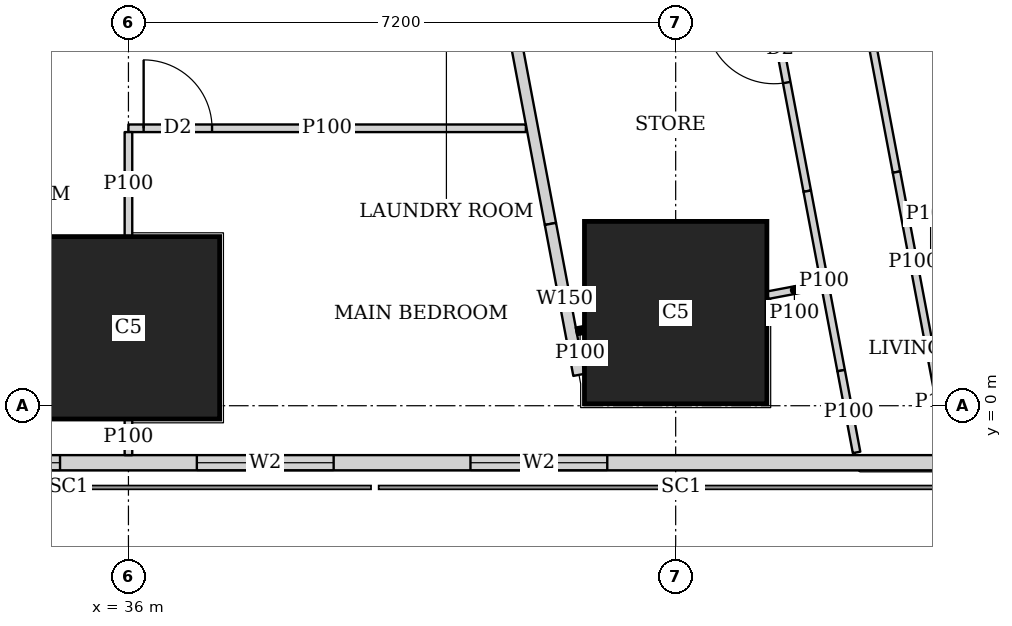
"""IFC4 building model, lengths in metres.
Left out: names, types, materials, properties, quantities, classifications, styles, units other than length and angle.
Written with IfcOpenShell. Run it as: python <this file> out.ifc"""

import sys

from ifc_helpers import new_model, si_unit, direction, frame, frame_2d, origin, origin_2d, place, context, subcontext, project, spatial, rectangle, extrude, element, fill, save


model = new_model("IFC4")
c1 = context("Model", 3, precision=1e-05, world=origin(), true_north=direction((0.0, 1.0)))
c2 = subcontext(c1, "Body", "Model", "MODEL_VIEW")
j1 = project(units=[si_unit("LENGTHUNIT", "METRE"), si_unit("PLANEANGLEUNIT", "RADIAN")], contexts=[c1])
p1 = place(None, origin())
s1 = spatial("IfcSite", under=j1, at=p1, CompositionType="ELEMENT")
p2 = place(p1, origin())
s2 = spatial("IfcBuilding", under=s1, at=p2, CompositionType="ELEMENT")
p3 = place(p2, frame((0.0, 0.0, 242.45)))
s3 = spatial("IfcBuildingStorey", under=s2, at=p3, CompositionType="ELEMENT", Elevation=242.45)
for number, where, z_axis, x_axis in (
    (1, (36.0, 1.025, 0.0), (0.0, 0.0, 1.0), (1.0, 0.0, 0.0)),
    (2, (43.2, 1.225, 0.0), (0.0, 0.0, 1.0), (1.0, 0.0, 0.0)),
):
    element("IfcColumn", number, at=place(p3, frame(where, z_axis=z_axis, x_axis=x_axis)), inside=s3, PredefinedType="COLUMN", context=c2, shape_type="SweptSolid", body=[
        extrude(rectangle(XDim=2.4, YDim=2.4, at=origin_2d()), origin(), (0.0, 0.0, 1.0), 3.75),
    ])
p4 = place(p3, frame((14.563, -0.75, 0.0), z_axis=(0.0, 0.0, 1.0), x_axis=(1.0, 0.0, 0.0)))
e3 = element("IfcWall", 3, at=p4, inside=s3, PredefinedType="SOLIDWALL", context=c2, shape_type="SweptSolid", body=[
    extrude(rectangle(XDim=33.228, YDim=0.2, at=frame_2d((16.614, 0.0))), origin(), (0.0, 0.0, 1.0), 3.45),
])
p5 = place(p4, frame((2.319, 0.0, 0.9)))
e4 = element("IfcOpeningElement", 4, at=p5, cuts=e3, PredefinedType="OPENING", context=c2, shape_type="SweptSolid", body=[
    extrude(rectangle(XDim=2.4, YDim=1.5, at=frame_2d((1.2, 0.75))), frame((0.0, 0.11, 0.0), z_axis=(0.0, -1.0, 0.0), x_axis=(1.0, 0.0, 0.0)), (0.0, 0.0, 1.0), 0.22),
])
p6 = place(p4, frame((7.937, 0.0, 0.9)))
e5 = element("IfcOpeningElement", 5, at=p6, cuts=e3, PredefinedType="OPENING", context=c2, shape_type="SweptSolid", body=[
    extrude(rectangle(XDim=1.8, YDim=1.5, at=frame_2d((0.9, 0.75))), frame((0.0, 0.11, 0.0), z_axis=(0.0, -1.0, 0.0), x_axis=(1.0, 0.0, 0.0)), (0.0, 0.0, 1.0), 0.22),
])
p7 = place(p4, frame((11.537, 0.0, 0.9)))
e6 = element("IfcOpeningElement", 6, at=p7, cuts=e3, PredefinedType="OPENING", context=c2, shape_type="SweptSolid", body=[
    extrude(rectangle(XDim=1.8, YDim=1.5, at=frame_2d((0.9, 0.75))), frame((0.0, 0.11, 0.0), z_axis=(0.0, -1.0, 0.0), x_axis=(1.0, 0.0, 0.0)), (0.0, 0.0, 1.0), 0.22),
])
p8 = place(p4, frame((15.137, 0.0, 0.9)))
e7 = element("IfcOpeningElement", 7, at=p8, cuts=e3, PredefinedType="OPENING", context=c2, shape_type="SweptSolid", body=[
    extrude(rectangle(XDim=1.8, YDim=1.5, at=frame_2d((0.9, 0.75))), frame((0.0, 0.11, 0.0), z_axis=(0.0, -1.0, 0.0), x_axis=(1.0, 0.0, 0.0)), (0.0, 0.0, 1.0), 0.22),
])
p9 = place(p4, frame((18.737, 0.0, 0.9)))
e8 = element("IfcOpeningElement", 8, at=p9, cuts=e3, PredefinedType="OPENING", context=c2, shape_type="SweptSolid", body=[
    extrude(rectangle(XDim=1.8, YDim=1.5, at=frame_2d((0.9, 0.75))), frame((0.0, 0.11, 0.0), z_axis=(0.0, -1.0, 0.0), x_axis=(1.0, 0.0, 0.0)), (0.0, 0.0, 1.0), 0.22),
])
p10 = place(p4, frame((22.337, 0.0, 0.9)))
e9 = element("IfcOpeningElement", 9, at=p10, cuts=e3, PredefinedType="OPENING", context=c2, shape_type="SweptSolid", body=[
    extrude(rectangle(XDim=1.8, YDim=1.5, at=frame_2d((0.9, 0.75))), frame((0.0, 0.11, 0.0), z_axis=(0.0, -1.0, 0.0), x_axis=(1.0, 0.0, 0.0)), (0.0, 0.0, 1.0), 0.22),
])
p11 = place(p4, frame((25.937, 0.0, 0.9)))
e10 = element("IfcOpeningElement", 10, at=p11, cuts=e3, PredefinedType="OPENING", context=c2, shape_type="SweptSolid", body=[
    extrude(rectangle(XDim=1.8, YDim=1.5, at=frame_2d((0.9, 0.75))), frame((0.0, 0.11, 0.0), z_axis=(0.0, -1.0, 0.0), x_axis=(1.0, 0.0, 0.0)), (0.0, 0.0, 1.0), 0.22),
])
p12 = place(p3, frame((50.653, 2.703, 0.0), z_axis=(0.0, 0.0, 1.0), x_axis=(-0.185612026696, 0.982623109613, 0.0)))
e11 = element("IfcWall", 11, at=p12, inside=s3, PredefinedType="SOLIDWALL", context=c2, shape_type="SweptSolid", body=[
    extrude(rectangle(XDim=41.393, YDim=0.2, at=frame_2d((20.697, 0.0))), origin(), (0.0, 0.0, 1.0), 3.45),
])
p13 = place(p12, frame((1.633, 0.0, 0.9)))
e12 = element("IfcOpeningElement", 12, at=p13, cuts=e11, PredefinedType="OPENING", context=c2, shape_type="SweptSolid", body=[
    extrude(rectangle(XDim=1.8, YDim=1.5, at=frame_2d((0.9, 0.75))), frame((0.0, 0.11, 0.0), z_axis=(0.0, -1.0, 0.0), x_axis=(1.0, 0.0, 0.0)), (0.0, 0.0, 1.0), 0.22),
])
p14 = place(p12, frame((6.032, 0.0, 0.9)))
e13 = element("IfcOpeningElement", 13, at=p14, cuts=e11, PredefinedType="OPENING", context=c2, shape_type="SweptSolid", body=[
    extrude(rectangle(XDim=1.8, YDim=1.5, at=frame_2d((0.9, 0.75))), frame((0.0, 0.11, 0.0), z_axis=(0.0, -1.0, 0.0), x_axis=(1.0, 0.0, 0.0)), (0.0, 0.0, 1.0), 0.22),
])
p15 = place(p12, frame((9.848, 0.0, 0.9)))
e14 = element("IfcOpeningElement", 14, at=p15, cuts=e11, PredefinedType="OPENING", context=c2, shape_type="SweptSolid", body=[
    extrude(rectangle(XDim=1.8, YDim=1.5, at=frame_2d((0.9, 0.75))), frame((0.0, 0.11, 0.0), z_axis=(0.0, -1.0, 0.0), x_axis=(1.0, 0.0, 0.0)), (0.0, 0.0, 1.0), 0.22),
])
p16 = place(p12, frame((13.664, 0.0, 0.9)))
e15 = element("IfcOpeningElement", 15, at=p16, cuts=e11, PredefinedType="OPENING", context=c2, shape_type="SweptSolid", body=[
    extrude(rectangle(XDim=1.8, YDim=1.5, at=frame_2d((0.9, 0.75))), frame((0.0, 0.11, 0.0), z_axis=(0.0, -1.0, 0.0), x_axis=(1.0, 0.0, 0.0)), (0.0, 0.0, 1.0), 0.22),
])
p17 = place(p12, frame((17.481, 0.0, 0.9)))
e16 = element("IfcOpeningElement", 16, at=p17, cuts=e11, PredefinedType="OPENING", context=c2, shape_type="SweptSolid", body=[
    extrude(rectangle(XDim=1.8, YDim=1.5, at=frame_2d((0.9, 0.75))), frame((0.0, 0.11, 0.0), z_axis=(0.0, -1.0, 0.0), x_axis=(1.0, 0.0, 0.0)), (0.0, 0.0, 1.0), 0.22),
])
p18 = place(p12, frame((21.297, 0.0, 0.9)))
e17 = element("IfcOpeningElement", 17, at=p18, cuts=e11, PredefinedType="OPENING", context=c2, shape_type="SweptSolid", body=[
    extrude(rectangle(XDim=1.8, YDim=1.5, at=frame_2d((0.9, 0.75))), frame((0.0, 0.11, 0.0), z_axis=(0.0, -1.0, 0.0), x_axis=(1.0, 0.0, 0.0)), (0.0, 0.0, 1.0), 0.22),
])
p19 = place(p12, frame((25.113, 0.0, 0.9)))
e18 = element("IfcOpeningElement", 18, at=p19, cuts=e11, PredefinedType="OPENING", context=c2, shape_type="SweptSolid", body=[
    extrude(rectangle(XDim=1.8, YDim=1.5, at=frame_2d((0.9, 0.75))), frame((0.0, 0.11, 0.0), z_axis=(0.0, -1.0, 0.0), x_axis=(1.0, 0.0, 0.0)), (0.0, 0.0, 1.0), 0.22),
])
p20 = place(p12, frame((28.93, 0.0, 0.9)))
e19 = element("IfcOpeningElement", 19, at=p20, cuts=e11, PredefinedType="OPENING", context=c2, shape_type="SweptSolid", body=[
    extrude(rectangle(XDim=1.8, YDim=1.5, at=frame_2d((0.9, 0.75))), frame((0.0, 0.11, 0.0), z_axis=(0.0, -1.0, 0.0), x_axis=(1.0, 0.0, 0.0)), (0.0, 0.0, 1.0), 0.22),
])
p21 = place(p12, frame((32.746, 0.0, 0.9)))
e20 = element("IfcOpeningElement", 20, at=p21, cuts=e11, PredefinedType="OPENING", context=c2, shape_type="SweptSolid", body=[
    extrude(rectangle(XDim=1.8, YDim=1.5, at=frame_2d((0.9, 0.75))), frame((0.0, 0.11, 0.0), z_axis=(0.0, -1.0, 0.0), x_axis=(1.0, 0.0, 0.0)), (0.0, 0.0, 1.0), 0.22),
])
p22 = place(p12, frame((36.481, 0.0, 0.9)))
e21 = element("IfcOpeningElement", 21, at=p22, cuts=e11, PredefinedType="OPENING", context=c2, shape_type="SweptSolid", body=[
    extrude(rectangle(XDim=1.8, YDim=1.5, at=frame_2d((0.9, 0.75))), frame((0.0, 0.11, 0.0), z_axis=(0.0, -1.0, 0.0), x_axis=(1.0, 0.0, 0.0)), (0.0, 0.0, 1.0), 0.22),
])
p23 = place(p3, frame((33.933, 42.73, 0.0), z_axis=(0.0, 0.0, 1.0), x_axis=(0.185595417643, -0.982626246825, 0.0)))
e22 = element("IfcWall", 22, at=p23, inside=s3, PredefinedType="SOLIDWALL", context=c2, shape_type="SweptSolid", body=[
    extrude(rectangle(XDim=41.051, YDim=0.15, at=frame_2d((20.525, 0.0))), origin(), (0.0, 0.0, 1.0), 2.45),
])
p24 = place(p23, frame((12.266, 0.0, 0.0)))
e23 = element("IfcOpeningElement", 23, at=p24, cuts=e22, PredefinedType="OPENING", context=c2, shape_type="SweptSolid", body=[
    extrude(rectangle(XDim=1.0, YDim=2.1, at=frame_2d((0.5, 1.05))), frame((0.0, 0.085, 0.0), z_axis=(0.0, -1.0, 0.0), x_axis=(1.0, 0.0, 0.0)), (0.0, 0.0, 1.0), 0.17),
])
p25 = place(p23, frame((16.082, 0.0, 0.0)))
e24 = element("IfcOpeningElement", 24, at=p25, cuts=e22, PredefinedType="OPENING", context=c2, shape_type="SweptSolid", body=[
    extrude(rectangle(XDim=1.0, YDim=2.1, at=frame_2d((0.5, 1.05))), frame((0.0, 0.085, 0.0), z_axis=(0.0, -1.0, 0.0), x_axis=(1.0, 0.0, 0.0)), (0.0, 0.0, 1.0), 0.17),
])
p26 = place(p23, frame((30.862, 0.0, 0.0)))
e25 = element("IfcOpeningElement", 25, at=p26, cuts=e22, PredefinedType="OPENING", context=c2, shape_type="SweptSolid", body=[
    extrude(rectangle(XDim=1.0, YDim=2.1, at=frame_2d((0.5, 1.05))), frame((0.0, 0.085, 0.0), z_axis=(0.0, -1.0, 0.0), x_axis=(1.0, 0.0, 0.0)), (0.0, 0.0, 1.0), 0.17),
])
p27 = place(p3, frame((41.552, 2.392, 0.0), z_axis=(0.0, 0.0, 1.0), x_axis=(0.185535500323, -0.982637561932, 0.0)))
e26 = element("IfcWall", 26, at=p27, inside=s3, PredefinedType="SOLIDWALL", context=c2, shape_type="SweptSolid", body=[
    extrude(rectangle(XDim=2.021, YDim=0.15, at=frame_2d((1.011, 0.0))), origin(), (0.0, 0.0, 1.0), 2.0),
])
p28 = place(p3, frame((41.229, 3.65, 0.0), z_axis=(0.0, 0.0, 1.0), x_axis=(-1.0, 0.0, 0.0)))
e27 = element("IfcWall", 27, at=p28, inside=s3, PredefinedType="PARTITIONING", context=c2, shape_type="SweptSolid", body=[
    extrude(rectangle(XDim=5.229, YDim=0.1, at=frame_2d((2.615, 0.0))), origin(), (0.0, 0.0, 1.0), 3.45),
])
p29 = place(p28, frame((4.129, 0.0, 0.0)))
e28 = element("IfcOpeningElement", 28, at=p29, cuts=e27, PredefinedType="OPENING", context=c2, shape_type="SweptSolid", body=[
    extrude(rectangle(XDim=0.9, YDim=2.1, at=frame_2d((0.45, 1.05))), frame((0.0, 0.06, 0.0), z_axis=(0.0, -1.0, 0.0), x_axis=(1.0, 0.0, 0.0)), (0.0, 0.0, 1.0), 0.12),
])
p30 = place(p3, frame((36.0, -0.65, 0.0), z_axis=(0.0, 0.0, 1.0), x_axis=(0.0, 1.0, 0.0)))
e29 = element("IfcWall", 29, at=p30, inside=s3, PredefinedType="PARTITIONING", context=c2, shape_type="SweptSolid", body=[
    extrude(rectangle(XDim=0.474, YDim=0.1, at=frame_2d((0.237, 0.0))), origin(), (0.0, 0.0, 1.0), 3.45),
])
p31 = place(p3, frame((36.0, 2.226, 0.0), z_axis=(0.0, 0.0, 1.0), x_axis=(0.0, 1.0, 0.0)))
e30 = element("IfcWall", 30, at=p31, inside=s3, PredefinedType="PARTITIONING", context=c2, shape_type="SweptSolid", body=[
    extrude(rectangle(XDim=1.374, YDim=0.1, at=frame_2d((0.687, 0.0))), origin(), (0.0, 0.0, 1.0), 3.45),
])
p32 = place(p3, frame((44.727, 10.366, 0.0), z_axis=(0.0, 0.0, 1.0), x_axis=(0.185678775129, -0.982610498858, 0.0)))
e31 = element("IfcWall", 31, at=p32, inside=s3, PredefinedType="PARTITIONING", context=c2, shape_type="SweptSolid", body=[
    extrude(rectangle(XDim=7.421, YDim=0.1, at=frame_2d((3.71, 0.0))), origin(), (0.0, 0.0, 1.0), 3.45),
])
p33 = place(p32, frame((0.151, 0.0, 0.0)))
e32 = element("IfcOpeningElement", 32, at=p33, cuts=e31, PredefinedType="OPENING", context=c2, shape_type="SweptSolid", body=[
    extrude(rectangle(XDim=0.9, YDim=2.1, at=frame_2d((0.45, 1.05))), frame((0.0, 0.06, 0.0), z_axis=(0.0, -1.0, 0.0), x_axis=(1.0, 0.0, 0.0)), (0.0, 0.0, 1.0), 0.12),
])
p34 = place(p32, frame((4.65, 0.0, 0.0)))
e33 = element("IfcOpeningElement", 33, at=p34, cuts=e31, PredefinedType="OPENING", context=c2, shape_type="SweptSolid", body=[
    extrude(rectangle(XDim=0.9, YDim=2.1, at=frame_2d((0.45, 1.05))), frame((0.0, 0.06, 0.0), z_axis=(0.0, -1.0, 0.0), x_axis=(1.0, 0.0, 0.0)), (0.0, 0.0, 1.0), 0.12),
])
p35 = place(p3, frame((46.105, 3.074, 0.0), z_axis=(0.0, 0.0, 1.0), x_axis=(0.185631845838, -0.982619365681, 0.0)))
e34 = element("IfcWall", 34, at=p35, inside=s3, PredefinedType="PARTITIONING", context=c2, shape_type="SweptSolid", body=[
    extrude(rectangle(XDim=2.403, YDim=0.1, at=frame_2d((1.201, 0.0))), origin(), (0.0, 0.0, 1.0), 2.0),
])
p36 = place(p3, frame((46.551, 0.713, 0.0), z_axis=(0.0, 0.0, 1.0), x_axis=(0.185407859198, -0.982661653748, 0.0)))
e35 = element("IfcWall", 35, at=p36, inside=s3, PredefinedType="PARTITIONING", context=c2, shape_type="SweptSolid", body=[
    extrude(rectangle(XDim=1.343, YDim=0.1, at=frame_2d((0.671, 0.0))), origin(), (0.0, 0.0, 1.0), 3.45),
])
p37 = place(p3, frame((43.949, 8.02, 0.0), z_axis=(0.0, 0.0, 1.0), x_axis=(0.185656792073, -0.982614652627, 0.0)))
e36 = element("IfcWall", 36, at=p37, inside=s3, PredefinedType="PARTITIONING", context=c2, shape_type="SweptSolid", body=[
    extrude(rectangle(XDim=5.289, YDim=0.1, at=frame_2d((2.645, 0.0))), origin(), (0.0, 0.0, 1.0), 3.45),
])
p38 = place(p37, frame((1.2, 0.0, 0.0)))
e37 = element("IfcOpeningElement", 37, at=p38, cuts=e36, PredefinedType="OPENING", context=c2, shape_type="SweptSolid", body=[
    extrude(rectangle(XDim=0.9, YDim=2.1, at=frame_2d((0.45, 1.05))), frame((0.0, 0.06, 0.0), z_axis=(0.0, -1.0, 0.0), x_axis=(1.0, 0.0, 0.0)), (0.0, 0.0, 1.0), 0.12),
])
p39 = place(p37, frame((2.935, 0.0, 0.0)))
e38 = element("IfcOpeningElement", 38, at=p39, cuts=e36, PredefinedType="OPENING", context=c2, shape_type="SweptSolid", body=[
    extrude(rectangle(XDim=0.9, YDim=2.1, at=frame_2d((0.45, 1.05))), frame((0.0, 0.06, 0.0), z_axis=(0.0, -1.0, 0.0), x_axis=(1.0, 0.0, 0.0)), (0.0, 0.0, 1.0), 0.12),
])
p40 = place(p3, frame((44.931, 2.823, 0.0), z_axis=(0.0, 0.0, 1.0), x_axis=(0.185631845838, -0.982619365681, 0.0)))
e39 = element("IfcWall", 39, at=p40, inside=s3, PredefinedType="PARTITIONING", context=c2, shape_type="SweptSolid", body=[
    extrude(rectangle(XDim=2.403, YDim=0.1, at=frame_2d((1.201, 0.0))), origin(), (0.0, 0.0, 1.0), 2.0),
])
p41 = place(p3, frame((45.377, 0.462, 0.0), z_axis=(0.0, 0.0, 1.0), x_axis=(0.185513480919, -0.982641719243, 0.0)))
e40 = element("IfcWall", 40, at=p41, inside=s3, PredefinedType="PARTITIONING", context=c2, shape_type="SweptSolid", body=[
    extrude(rectangle(XDim=1.095, YDim=0.1, at=frame_2d((0.547, 0.0))), origin(), (0.0, 0.0, 1.0), 3.45),
])
p42 = place(p3, frame((46.738, 2.006, 0.0), z_axis=(0.0, 0.0, 1.0), x_axis=(-0.982820466874, -0.184564161994, 0.0)))
e41 = element("IfcWall", 41, at=p42, inside=s3, PredefinedType="PARTITIONING", context=c2, shape_type="SweptSolid", body=[
    extrude(rectangle(XDim=0.374, YDim=0.1, at=frame_2d((0.187, 0.0))), origin(), (0.0, 0.0, 1.0), 2.0),
])
p43 = place(p3, frame((45.114, 1.587, 0.0), z_axis=(0.0, 0.0, 1.0), x_axis=(-0.982671022916, -0.185358195723, 0.0)))
e42 = element("IfcWall", 42, at=p43, inside=s3, PredefinedType="PARTITIONING", context=c2, shape_type="SweptSolid", body=[
    extrude(rectangle(XDim=0.717, YDim=0.1, at=frame_2d((0.358, 0.0))), origin(), (0.0, 0.0, 1.0), 2.0),
])
p44 = place(p3, frame((41.99, 0.997, 0.0), z_axis=(0.0, 0.0, 1.0), x_axis=(-0.982382747416, -0.186880008506, 0.0)))
e43 = element("IfcWall", 43, at=p44, inside=s3, PredefinedType="PARTITIONING", context=c2, shape_type="SweptSolid", body=[
    extrude(rectangle(XDim=0.097, YDim=0.1, at=frame_2d((0.048, 0.0))), origin(), (0.0, 0.0, 1.0), 2.0),
])
p45 = place(p9, origin())
e44 = element("IfcWindow", 44, at=p45, inside=s3, PartitioningType="SINGLE_PANEL", PredefinedType="WINDOW", context=c2, shape_type="SweptSolid", body=[
    extrude(rectangle(XDim=1.8, YDim=1.5, at=frame_2d((0.9, 0.75))), frame((0.0, 0.03, 0.0), z_axis=(0.0, -1.0, 0.0), x_axis=(1.0, 0.0, 0.0)), (0.0, 0.0, 1.0), 0.06),
])
fill(e8, e44)
p46 = place(p10, origin())
e45 = element("IfcWindow", 45, at=p46, inside=s3, PartitioningType="SINGLE_PANEL", PredefinedType="WINDOW", context=c2, shape_type="SweptSolid", body=[
    extrude(rectangle(XDim=1.8, YDim=1.5, at=frame_2d((0.9, 0.75))), frame((0.0, 0.03, 0.0), z_axis=(0.0, -1.0, 0.0), x_axis=(1.0, 0.0, 0.0)), (0.0, 0.0, 1.0), 0.06),
])
fill(e9, e45)
p47 = place(p11, origin())
e46 = element("IfcWindow", 46, at=p47, inside=s3, PartitioningType="SINGLE_PANEL", PredefinedType="WINDOW", context=c2, shape_type="SweptSolid", body=[
    extrude(rectangle(XDim=1.8, YDim=1.5, at=frame_2d((0.9, 0.75))), frame((0.0, 0.03, 0.0), z_axis=(0.0, -1.0, 0.0), x_axis=(1.0, 0.0, 0.0)), (0.0, 0.0, 1.0), 0.06),
])
fill(e10, e46)
p48 = place(p29, origin())
e47 = element("IfcDoor", 47, at=p48, inside=s3, OperationType="SINGLE_SWING_LEFT", PredefinedType="DOOR", context=c2, shape_type="SweptSolid", body=[
    extrude(rectangle(XDim=0.9, YDim=2.1, at=frame_2d((0.45, 1.05))), frame((0.0, 0.025, 0.0), z_axis=(0.0, -1.0, 0.0), x_axis=(1.0, 0.0, 0.0)), (0.0, 0.0, 1.0), 0.05),
])
fill(e28, e47)
p49 = place(p39, origin())
e48 = element("IfcDoor", 48, at=p49, inside=s3, OperationType="SINGLE_SWING_RIGHT", PredefinedType="DOOR", context=c2, shape_type="SweptSolid", body=[
    extrude(rectangle(XDim=0.9, YDim=2.1, at=frame_2d((0.45, 1.05))), frame((0.0, 0.025, 0.0), z_axis=(0.0, -1.0, 0.0), x_axis=(1.0, 0.0, 0.0)), (0.0, 0.0, 1.0), 0.05),
])
fill(e38, e48)
save(model, sys.argv[1])
